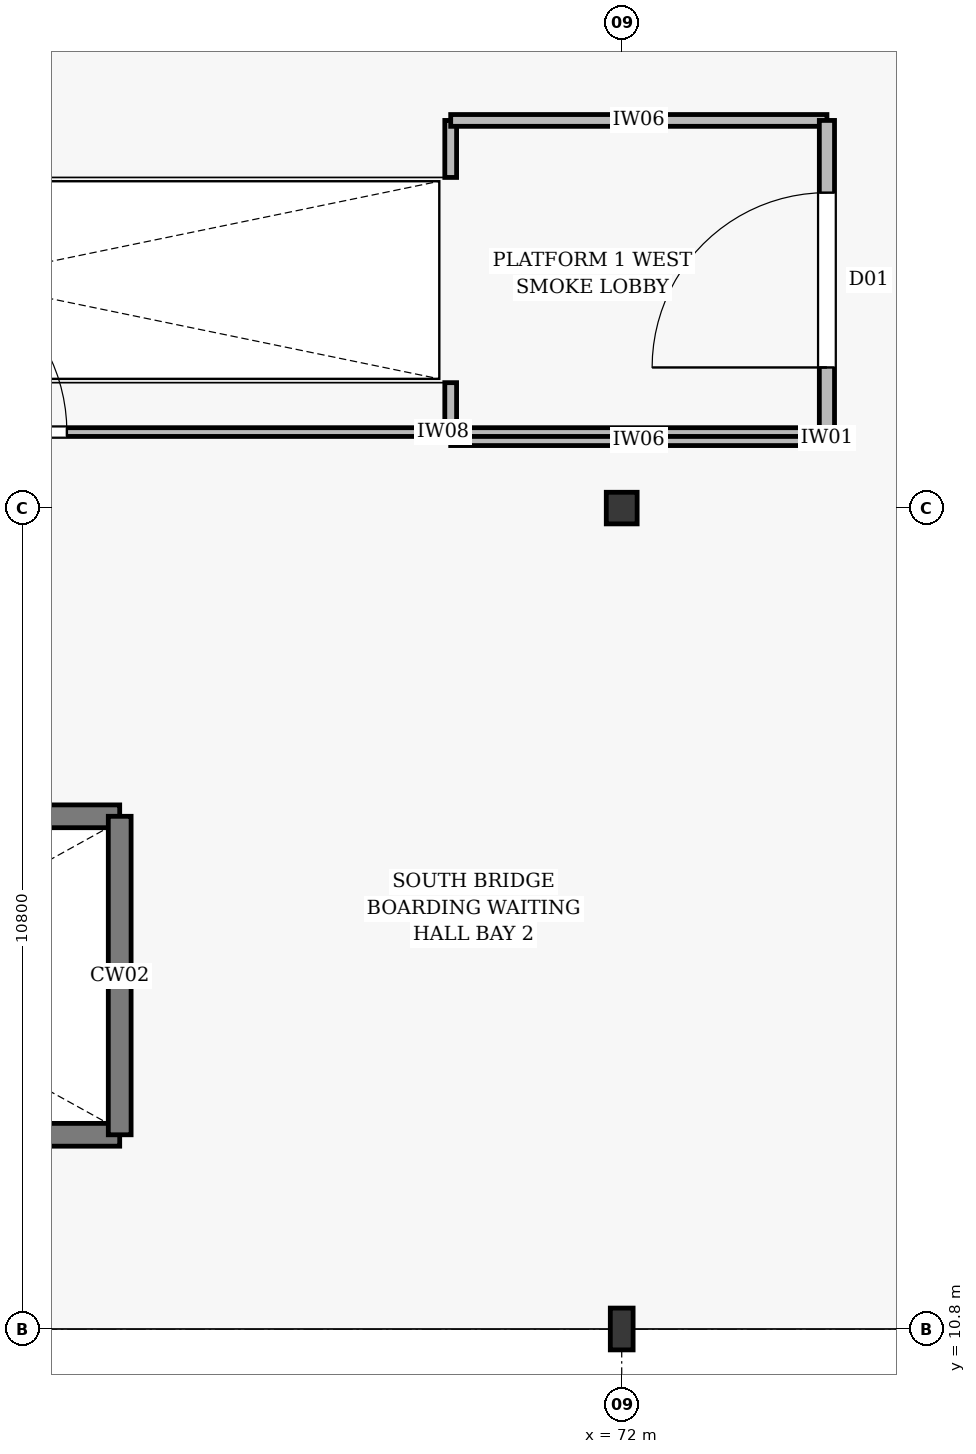
"""IFC4 building model, lengths in metres.
Left out: names, types, materials, properties, quantities, classifications, styles, units other than length and angle.
Written with IfcOpenShell. Run it as: python <this file> out.ifc"""

import sys

from ifc_helpers import new_model, si_unit, direction, frame, frame_2d, origin, origin_2d, place, context, subcontext, project, spatial, rectangle, i_section, extrude, element, fill, save


model = new_model("IFC4")
c1 = context("Model", 3, precision=1e-05, world=origin(), true_north=direction((0.0, 1.0)))
c2 = subcontext(c1, "Body", "Model", "MODEL_VIEW")
j1 = project(units=[si_unit("LENGTHUNIT", "METRE"), si_unit("PLANEANGLEUNIT", "RADIAN")], contexts=[c1])
p1 = place(None, origin())
s1 = spatial("IfcSite", under=j1, at=p1, CompositionType="ELEMENT")
p2 = place(p1, origin())
s2 = spatial("IfcBuilding", under=s1, at=p2, CompositionType="ELEMENT")
p3 = place(p2, frame((0.0, 0.0, 6.6)))
s3 = spatial("IfcBuildingStorey", under=s2, at=p3, CompositionType="ELEMENT", Elevation=6.6)
p4 = place(p3, frame((72.0, 10.8, 0.0), z_axis=(0.0, 0.0, 1.0), x_axis=(1.0, 0.0, 0.0)))
e1 = element("IfcColumn", 1, at=p4, inside=s3, PredefinedType="COLUMN", context=c2, shape_type="SweptSolid", body=[
    extrude(i_section(OverallWidth=0.3, OverallDepth=0.55, WebThickness=0.015, FlangeThickness=0.029, at=origin_2d()), origin(), (0.0, 0.0, 1.0), 6.0),
])
p5 = place(p3, frame((72.0, 21.6, 0.0), z_axis=(0.0, 0.0, 1.0), x_axis=(1.0, 0.0, 0.0)))
e2 = element("IfcColumn", 2, at=p5, inside=s3, PredefinedType="COLUMN", context=c2, shape_type="SweptSolid", body=[
    extrude(i_section(OverallWidth=0.406, OverallDepth=0.416, WebThickness=0.023, FlangeThickness=0.035, at=origin_2d()), origin(), (0.0, 0.0, 1.0), 6.0),
])
p6 = place(p3, frame((55.355, 13.355, 0.0), z_axis=(0.0, 0.0, 1.0), x_axis=(1.0, 0.0, 0.0)))
e3 = element("IfcWall", 3, at=p6, inside=s3, PredefinedType="SOLIDWALL", context=c2, shape_type="SweptSolid", body=[
    extrude(rectangle(XDim=10.04, YDim=0.3, at=frame_2d((5.02, 0.0))), origin(), (0.0, 0.0, 1.0), 6.0),
])
p7 = place(p3, frame((55.355, 17.545, 0.0), z_axis=(0.0, 0.0, 1.0), x_axis=(1.0, 0.0, 0.0)))
e4 = element("IfcWall", 4, at=p7, inside=s3, PredefinedType="SOLIDWALL", context=c2, shape_type="SweptSolid", body=[
    extrude(rectangle(XDim=10.04, YDim=0.3, at=frame_2d((5.02, 0.0))), origin(), (0.0, 0.0, 1.0), 6.0),
])
p8 = place(p7, frame((0.35, 0.0, 0.005)))
e5 = element("IfcOpeningElement", 5, at=p8, cuts=e4, PredefinedType="OPENING", context=c2, shape_type="SweptSolid", body=[
    extrude(rectangle(XDim=1.9, YDim=2.2, at=frame_2d((0.95, 1.1))), frame((0.0, 0.162, 0.0), z_axis=(0.0, -1.0, 0.0), x_axis=(1.0, 0.0, 0.0)), (0.0, 0.0, 1.0), 0.324),
])
p9 = place(p3, frame((65.395, 13.355, 0.0), z_axis=(0.0, 0.0, 1.0), x_axis=(0.0, 1.0, 0.0)))
e6 = element("IfcWall", 6, at=p9, inside=s3, PredefinedType="SOLIDWALL", context=c2, shape_type="SweptSolid", body=[
    extrude(rectangle(XDim=4.19, YDim=0.3, at=frame_2d((2.095, 0.0))), origin(), (0.0, 0.0, 1.0), 6.0),
])
for number, where, z_axis, x_axis in (
    (7, (69.75, 22.5, 0.0), (0.0, 0.0, 1.0), (0.0, 1.0, 0.0)),
    (8, (69.75, 25.95, 0.0), (0.0, 0.0, 1.0), (0.0, 1.0, 0.0)),
):
    element("IfcWall", number, at=place(p3, frame(where, z_axis=z_axis, x_axis=x_axis)), inside=s3, PredefinedType="PARTITIONING", context=c2, shape_type="SweptSolid", body=[
        extrude(rectangle(XDim=0.75, YDim=0.155, at=frame_2d((0.375, 0.0))), origin(), (0.0, 0.0, 1.0), 2.62),
    ])
for number, where, z_axis, x_axis in (
    (9, (69.75, 22.5, 0.0), (0.0, 0.0, 1.0), (1.0, 0.0, 0.0)),
    (10, (69.75, 26.7, 0.0), (0.0, 0.0, 1.0), (1.0, 0.0, 0.0)),
):
    element("IfcWall", number, at=place(p3, frame(where, z_axis=z_axis, x_axis=x_axis)), inside=s3, PredefinedType="PARTITIONING", context=c2, shape_type="SweptSolid", body=[
        extrude(rectangle(XDim=4.95, YDim=0.155, at=frame_2d((2.475, 0.0))), origin(), (0.0, 0.0, 1.0), 2.62),
    ])
p10 = place(p3, frame((74.7, 22.5, 0.0), z_axis=(0.0, 0.0, 1.0), x_axis=(0.0, 1.0, 0.0)))
e11 = element("IfcWall", 11, at=p10, inside=s3, PredefinedType="PARTITIONING", context=c2, shape_type="SweptSolid", body=[
    extrude(rectangle(XDim=4.2, YDim=0.2, at=frame_2d((2.1, 0.0))), origin(), (0.0, 0.0, 1.0), 2.62),
])
p11 = place(p10, frame((0.95, 0.0, 0.005)))
e12 = element("IfcOpeningElement", 12, at=p11, cuts=e11, PredefinedType="OPENING", context=c2, shape_type="SweptSolid", body=[
    extrude(rectangle(XDim=2.3, YDim=2.4, at=frame_2d((1.15, 1.2))), frame((0.0, 0.112, 0.0), z_axis=(0.0, -1.0, 0.0), x_axis=(1.0, 0.0, 0.0)), (0.0, 0.0, 1.0), 0.224),
])
p12 = place(p3, frame((54.208, 22.6, 0.0), z_axis=(0.0, 0.0, 1.0), x_axis=(1.0, 0.0, 0.0)))
e13 = element("IfcWall", 13, at=p12, inside=s3, PredefinedType="PARTITIONING", context=c2, shape_type="SweptSolid", body=[
    extrude(rectangle(XDim=20.394, YDim=0.115, at=frame_2d((10.197, 0.0))), origin(), (0.0, 0.0, 1.0), 5.06),
])
p13 = place(p12, frame((8.192, 0.0, 0.005)))
e14 = element("IfcOpeningElement", 14, at=p13, cuts=e13, PredefinedType="OPENING", context=c2, shape_type="SweptSolid", body=[
    extrude(rectangle(XDim=2.3, YDim=2.4, at=frame_2d((1.15, 1.2))), frame((0.0, 0.069, 0.0), z_axis=(0.0, -1.0, 0.0), x_axis=(1.0, 0.0, 0.0)), (0.0, 0.0, 1.0), 0.139),
])
p14 = place(p11, origin())
e15 = element("IfcDoor", 15, at=p14, inside=s3, OperationType="DOUBLE_DOOR_SINGLE_SWING", PredefinedType="DOOR", context=c2, shape_type="SweptSolid", body=[
    extrude(rectangle(XDim=2.3, YDim=2.4, at=frame_2d((1.15, 1.2))), frame((0.0, 0.025, 0.0), z_axis=(0.0, -1.0, 0.0), x_axis=(1.0, 0.0, 0.0)), (0.0, 0.0, 1.0), 0.05),
])
fill(e12, e15)
p15 = place(p13, origin())
e16 = element("IfcDoor", 16, at=p15, inside=s3, OperationType="DOUBLE_DOOR_SINGLE_SWING", PredefinedType="DOOR", context=c2, shape_type="SweptSolid", body=[
    extrude(rectangle(XDim=2.3, YDim=2.4, at=frame_2d((1.15, 1.2))), frame((0.0, 0.025, 0.0), z_axis=(0.0, -1.0, 0.0), x_axis=(1.0, 0.0, 0.0)), (0.0, 0.0, 1.0), 0.05),
])
fill(e14, e16)
save(model, sys.argv[1])
